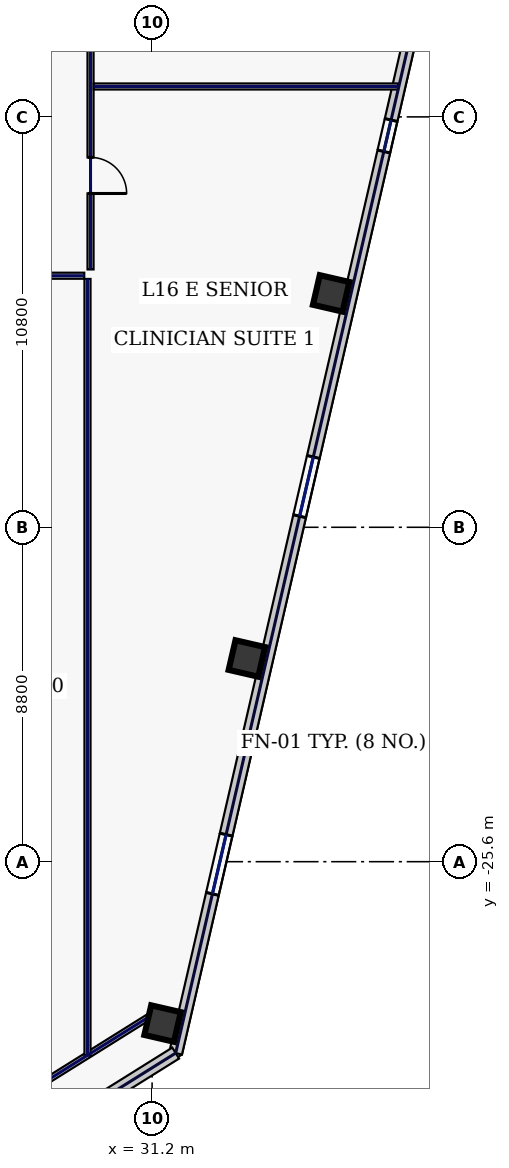
"""IFC4 building model, lengths in metres.
Left out: names, types, materials, properties, quantities, classifications, styles, units other than length and angle.
Written with IfcOpenShell. Run it as: python <this file> out.ifc"""

import sys

from ifc_helpers import new_model, si_unit, direction, frame, frame_2d, origin, origin_2d, place, context, subcontext, project, spatial, rectangle, hollow_rectangle, extrude, element, fill, save


model = new_model("IFC4")
c1 = context("Model", 3, precision=1e-05, world=origin(), true_north=direction((0.0, 1.0)))
c2 = subcontext(c1, "Body", "Model", "MODEL_VIEW")
j1 = project(units=[si_unit("LENGTHUNIT", "METRE"), si_unit("PLANEANGLEUNIT", "RADIAN")], contexts=[c1])
p1 = place(None, origin())
s1 = spatial("IfcSite", under=j1, at=p1, CompositionType="ELEMENT")
p2 = place(p1, origin())
s2 = spatial("IfcBuilding", under=s1, at=p2, CompositionType="ELEMENT")
p3 = place(p2, frame((0.0, 0.0, 75.4)))
s3 = spatial("IfcBuildingStorey", under=s2, at=p3, CompositionType="ELEMENT", Elevation=75.4)
for number, where, z_axis, x_axis in (
    (1, (31.476, -29.86, 0.0), (0.0, 0.0, 1.0), (0.974, -0.225, 0.0)),
    (2, (33.694, -20.252, 0.0), (0.0, 0.0, 1.0), (0.974, -0.225, 0.0)),
    (3, (35.912, -10.645, 0.0), (0.0, 0.0, 1.0), (0.974, -0.225, 0.0)),
):
    element("IfcColumn", number, at=place(p3, frame(where, z_axis=z_axis, x_axis=x_axis)), inside=s3, PredefinedType="COLUMN", context=c2, shape_type="SweptSolid", body=[
        extrude(hollow_rectangle(XDim=0.8, YDim=0.8, WallThickness=0.036, at=origin_2d()), origin(), (0.0, 0.0, 1.0), 3.74),
    ])
p4 = place(p3, frame((31.82, -30.637, 0.0), z_axis=(0.0, 0.0, 1.0), x_axis=(0.224949969076, 0.974370315338, 0.0)))
e4 = element("IfcWall", 4, at=p4, inside=s3, PredefinedType="STANDARD", context=c2, shape_type="SweptSolid", body=[
    extrude(rectangle(XDim=40.8, YDim=0.34, at=frame_2d((20.4, 0.0))), origin(), (0.0, 0.0, 1.0), 3.74),
])
p5 = place(p4, frame((4.3, 0.0, 0.58)))
e5 = element("IfcOpeningElement", 5, at=p5, cuts=e4, PredefinedType="OPENING", context=c2, shape_type="SweptSolid", body=[
    extrude(rectangle(XDim=1.6, YDim=2.3, at=frame_2d((0.8, 1.15))), frame((0.0, 0.18, 0.0), z_axis=(0.0, -1.0, 0.0), x_axis=(1.0, 0.0, 0.0)), (0.0, 0.0, 1.0), 0.36),
])
p6 = place(p4, frame((14.5, 0.0, 0.58)))
e6 = element("IfcOpeningElement", 6, at=p6, cuts=e4, PredefinedType="OPENING", context=c2, shape_type="SweptSolid", body=[
    extrude(rectangle(XDim=1.6, YDim=2.3, at=frame_2d((0.8, 1.15))), frame((0.0, 0.18, 0.0), z_axis=(0.0, -1.0, 0.0), x_axis=(1.0, 0.0, 0.0)), (0.0, 0.0, 1.0), 0.36),
])
p7 = place(p4, frame((24.35, 0.0, 0.75)))
e7 = element("IfcOpeningElement", 7, at=p7, cuts=e4, PredefinedType="OPENING", context=c2, shape_type="SweptSolid", body=[
    extrude(rectangle(XDim=0.85, YDim=1.85, at=frame_2d((0.425, 0.925))), frame((0.0, 0.18, 0.0), z_axis=(0.0, -1.0, 0.0), x_axis=(1.0, 0.0, 0.0)), (0.0, 0.0, 1.0), 0.36),
])
p8 = place(p4, frame((34.55, 0.0, 0.75)))
e8 = element("IfcOpeningElement", 8, at=p8, cuts=e4, PredefinedType="OPENING", context=c2, shape_type="SweptSolid", body=[
    extrude(rectangle(XDim=0.85, YDim=1.85, at=frame_2d((0.425, 0.925))), frame((0.0, 0.18, 0.0), z_axis=(0.0, -1.0, 0.0), x_axis=(1.0, 0.0, 0.0)), (0.0, 0.0, 1.0), 0.36),
])
p9 = place(p3, frame((25.788, -34.406, 0.0), z_axis=(0.0, 0.0, 1.0), x_axis=(0.848046504656, 0.529921811158, 0.0)))
e9 = element("IfcWall", 9, at=p9, inside=s3, PredefinedType="STANDARD", context=c2, shape_type="SweptSolid", body=[
    extrude(rectangle(XDim=7.113, YDim=0.34, at=frame_2d((3.557, 0.0))), origin(), (0.0, 0.0, 1.0), 3.74),
])
p10 = place(p3, frame((25.06, -33.468, 0.0), z_axis=(0.0, 0.0, 1.0), x_axis=(0.848043064089, 0.529927317139, 0.0)))
e10 = element("IfcWall", 10, at=p10, inside=s3, PredefinedType="PARTITIONING", context=c2, shape_type="SweptSolid", body=[
    extrude(rectangle(XDim=7.354, YDim=0.16, at=frame_2d((3.677, 0.0))), origin(), (0.0, 0.0, 1.0), 3.74),
])
p11 = place(p3, frame((29.58, 10.115, 0.0), z_axis=(0.0, 0.0, 1.0), x_axis=(0.0, -1.0, 0.0)))
e11 = element("IfcWall", 11, at=p11, inside=s3, PredefinedType="PARTITIONING", context=c2, shape_type="SweptSolid", body=[
    extrude(rectangle(XDim=20.13, YDim=0.16, at=frame_2d((10.065, 0.0))), origin(), (0.0, 0.0, 1.0), 3.74),
])
p12 = place(p11, frame((17.181, 0.0, 0.0)))
e12 = element("IfcOpeningElement", 12, at=p12, cuts=e11, PredefinedType="OPENING", context=c2, shape_type="SweptSolid", body=[
    extrude(rectangle(XDim=0.95, YDim=2.2, at=frame_2d((0.475, 1.1))), frame((0.0, 0.09, 0.0), z_axis=(0.0, -1.0, 0.0), x_axis=(1.0, 0.0, 0.0)), (0.0, 0.0, 1.0), 0.18),
])
p13 = place(p11, frame((12.95, 0.0, 0.0)))
e13 = element("IfcOpeningElement", 13, at=p13, cuts=e11, PredefinedType="OPENING", context=c2, shape_type="SweptSolid", body=[
    extrude(rectangle(XDim=0.95, YDim=2.2, at=frame_2d((0.475, 1.1))), frame((0.0, 0.09, 0.0), z_axis=(0.0, -1.0, 0.0), x_axis=(1.0, 0.0, 0.0)), (0.0, 0.0, 1.0), 0.18),
])
p14 = place(p11, frame((7.75, 0.0, 0.0)))
e14 = element("IfcOpeningElement", 14, at=p14, cuts=e11, PredefinedType="OPENING", context=c2, shape_type="SweptSolid", body=[
    extrude(rectangle(XDim=0.95, YDim=2.2, at=frame_2d((0.475, 1.1))), frame((0.0, 0.09, 0.0), z_axis=(0.0, -1.0, 0.0), x_axis=(1.0, 0.0, 0.0)), (0.0, 0.0, 1.0), 0.18),
])
p15 = place(p11, frame((2.219, 0.0, 0.0)))
e15 = element("IfcOpeningElement", 15, at=p15, cuts=e11, PredefinedType="OPENING", context=c2, shape_type="SweptSolid", body=[
    extrude(rectangle(XDim=0.95, YDim=2.2, at=frame_2d((0.475, 1.1))), frame((0.0, 0.09, 0.0), z_axis=(0.0, -1.0, 0.0), x_axis=(1.0, 0.0, 0.0)), (0.0, 0.0, 1.0), 0.18),
])
p16 = place(p3, frame((29.415, -10.18, 0.0), z_axis=(0.0, 0.0, 1.0), x_axis=(-1.0, 0.0, 0.0)))
e16 = element("IfcWall", 16, at=p16, inside=s3, PredefinedType="PARTITIONING", context=c2, shape_type="SweptSolid", body=[
    extrude(rectangle(XDim=58.83, YDim=0.16, at=frame_2d((29.415, 0.0))), origin(), (0.0, 0.0, 1.0), 3.74),
])
p17 = place(p16, frame((55.831, 0.0, 0.0)))
e17 = element("IfcOpeningElement", 17, at=p17, cuts=e16, PredefinedType="OPENING", context=c2, shape_type="SweptSolid", body=[
    extrude(rectangle(XDim=1.3, YDim=2.2, at=frame_2d((0.65, 1.1))), frame((0.0, 0.09, 0.0), z_axis=(0.0, -1.0, 0.0), x_axis=(1.0, 0.0, 0.0)), (0.0, 0.0, 1.0), 0.18),
])
p18 = place(p16, frame((49.775, 0.0, 0.0)))
e18 = element("IfcOpeningElement", 18, at=p18, cuts=e16, PredefinedType="OPENING", context=c2, shape_type="SweptSolid", body=[
    extrude(rectangle(XDim=1.3, YDim=2.2, at=frame_2d((0.65, 1.1))), frame((0.0, 0.09, 0.0), z_axis=(0.0, -1.0, 0.0), x_axis=(1.0, 0.0, 0.0)), (0.0, 0.0, 1.0), 0.18),
])
p19 = place(p16, frame((43.2, 0.0, 0.0)))
e19 = element("IfcOpeningElement", 19, at=p19, cuts=e16, PredefinedType="OPENING", context=c2, shape_type="SweptSolid", body=[
    extrude(rectangle(XDim=0.95, YDim=2.2, at=frame_2d((0.475, 1.1))), frame((0.0, 0.09, 0.0), z_axis=(0.0, -1.0, 0.0), x_axis=(1.0, 0.0, 0.0)), (0.0, 0.0, 1.0), 0.18),
])
p20 = place(p16, frame((38.0, 0.0, 0.0)))
e20 = element("IfcOpeningElement", 20, at=p20, cuts=e16, PredefinedType="OPENING", context=c2, shape_type="SweptSolid", body=[
    extrude(rectangle(XDim=0.95, YDim=2.2, at=frame_2d((0.475, 1.1))), frame((0.0, 0.09, 0.0), z_axis=(0.0, -1.0, 0.0), x_axis=(1.0, 0.0, 0.0)), (0.0, 0.0, 1.0), 0.18),
])
p21 = place(p16, frame((32.7, 0.0, 0.0)))
e21 = element("IfcOpeningElement", 21, at=p21, cuts=e16, PredefinedType="OPENING", context=c2, shape_type="SweptSolid", body=[
    extrude(rectangle(XDim=0.95, YDim=2.2, at=frame_2d((0.475, 1.1))), frame((0.0, 0.09, 0.0), z_axis=(0.0, -1.0, 0.0), x_axis=(1.0, 0.0, 0.0)), (0.0, 0.0, 1.0), 0.18),
])
p22 = place(p16, frame((27.3, 0.0, 0.0)))
e22 = element("IfcOpeningElement", 22, at=p22, cuts=e16, PredefinedType="OPENING", context=c2, shape_type="SweptSolid", body=[
    extrude(rectangle(XDim=0.95, YDim=2.2, at=frame_2d((0.475, 1.1))), frame((0.0, 0.09, 0.0), z_axis=(0.0, -1.0, 0.0), x_axis=(1.0, 0.0, 0.0)), (0.0, 0.0, 1.0), 0.18),
])
p23 = place(p16, frame((21.87, 0.0, 0.0)))
e23 = element("IfcOpeningElement", 23, at=p23, cuts=e16, PredefinedType="OPENING", context=c2, shape_type="SweptSolid", body=[
    extrude(rectangle(XDim=1.05, YDim=2.2, at=frame_2d((0.525, 1.1))), frame((0.0, 0.09, 0.0), z_axis=(0.0, -1.0, 0.0), x_axis=(1.0, 0.0, 0.0)), (0.0, 0.0, 1.0), 0.18),
])
p24 = place(p16, frame((16.41, 0.0, 0.0)))
e24 = element("IfcOpeningElement", 24, at=p24, cuts=e16, PredefinedType="OPENING", context=c2, shape_type="SweptSolid", body=[
    extrude(rectangle(XDim=0.95, YDim=2.2, at=frame_2d((0.475, 1.1))), frame((0.0, 0.09, 0.0), z_axis=(0.0, -1.0, 0.0), x_axis=(1.0, 0.0, 0.0)), (0.0, 0.0, 1.0), 0.18),
])
p25 = place(p16, frame((11.66, 0.0, 0.0)))
e25 = element("IfcOpeningElement", 25, at=p25, cuts=e16, PredefinedType="OPENING", context=c2, shape_type="SweptSolid", body=[
    extrude(rectangle(XDim=1.45, YDim=2.2, at=frame_2d((0.725, 1.1))), frame((0.0, 0.09, 0.0), z_axis=(0.0, -1.0, 0.0), x_axis=(1.0, 0.0, 0.0)), (0.0, 0.0, 1.0), 0.18),
])
p26 = place(p16, frame((7.97, 0.0, 0.0)))
e26 = element("IfcOpeningElement", 26, at=p26, cuts=e16, PredefinedType="OPENING", context=c2, shape_type="SweptSolid", body=[
    extrude(rectangle(XDim=1.3, YDim=2.2, at=frame_2d((0.65, 1.1))), frame((0.0, 0.09, 0.0), z_axis=(0.0, -1.0, 0.0), x_axis=(1.0, 0.0, 0.0)), (0.0, 0.0, 1.0), 0.18),
])
p27 = place(p16, frame((4.375, 0.0, 0.0)))
e27 = element("IfcOpeningElement", 27, at=p27, cuts=e16, PredefinedType="OPENING", context=c2, shape_type="SweptSolid", body=[
    extrude(rectangle(XDim=1.3, YDim=2.2, at=frame_2d((0.65, 1.1))), frame((0.0, 0.09, 0.0), z_axis=(0.0, -1.0, 0.0), x_axis=(1.0, 0.0, 0.0)), (0.0, 0.0, 1.0), 0.18),
])
p28 = place(p16, frame((1.244, 0.0, 0.0)))
e28 = element("IfcOpeningElement", 28, at=p28, cuts=e16, PredefinedType="OPENING", context=c2, shape_type="SweptSolid", body=[
    extrude(rectangle(XDim=1.05, YDim=2.2, at=frame_2d((0.525, 1.1))), frame((0.0, 0.09, 0.0), z_axis=(0.0, -1.0, 0.0), x_axis=(1.0, 0.0, 0.0)), (0.0, 0.0, 1.0), 0.18),
])
p29 = place(p3, frame((29.5, -30.703, 0.0), z_axis=(0.0, 0.0, 1.0), x_axis=(0.0, 1.0, 0.0)))
e29 = element("IfcWall", 29, at=p29, inside=s3, PredefinedType="PARTITIONING", context=c2, shape_type="SweptSolid", body=[
    extrude(rectangle(XDim=20.438, YDim=0.16, at=frame_2d((10.219, 0.0))), origin(), (0.0, 0.0, 1.0), 3.74),
])
p30 = place(p3, frame((29.665, -5.2, 0.0), z_axis=(0.0, 0.0, 1.0), x_axis=(1.0, 0.0, 0.0)))
e30 = element("IfcWall", 30, at=p30, inside=s3, PredefinedType="PARTITIONING", context=c2, shape_type="SweptSolid", body=[
    extrude(rectangle(XDim=8.007, YDim=0.16, at=frame_2d((4.003, 0.0))), origin(), (0.0, 0.0, 1.0), 3.74),
])
p31 = place(p5, origin())
e31 = element("IfcWindow", 31, at=p31, inside=s3, PartitioningType="SINGLE_PANEL", PredefinedType="WINDOW", context=c2, shape_type="SweptSolid", body=[
    extrude(rectangle(XDim=1.6, YDim=2.3, at=frame_2d((0.8, 1.15))), frame((0.0, 0.03, 0.0), z_axis=(0.0, -1.0, 0.0), x_axis=(1.0, 0.0, 0.0)), (0.0, 0.0, 1.0), 0.06),
])
fill(e5, e31)
p32 = place(p6, origin())
e32 = element("IfcWindow", 32, at=p32, inside=s3, PartitioningType="SINGLE_PANEL", PredefinedType="WINDOW", context=c2, shape_type="SweptSolid", body=[
    extrude(rectangle(XDim=1.6, YDim=2.3, at=frame_2d((0.8, 1.15))), frame((0.0, 0.03, 0.0), z_axis=(0.0, -1.0, 0.0), x_axis=(1.0, 0.0, 0.0)), (0.0, 0.0, 1.0), 0.06),
])
fill(e6, e32)
p33 = place(p7, origin())
e33 = element("IfcWindow", 33, at=p33, inside=s3, PartitioningType="SINGLE_PANEL", PredefinedType="WINDOW", context=c2, shape_type="SweptSolid", body=[
    extrude(rectangle(XDim=0.85, YDim=1.85, at=frame_2d((0.425, 0.925))), frame((0.0, 0.03, 0.0), z_axis=(0.0, -1.0, 0.0), x_axis=(1.0, 0.0, 0.0)), (0.0, 0.0, 1.0), 0.06),
])
fill(e7, e33)
p34 = place(p12, origin())
e34 = element("IfcDoor", 34, at=p34, inside=s3, OperationType="SINGLE_SWING_RIGHT", PredefinedType="DOOR", context=c2, shape_type="SweptSolid", body=[
    extrude(rectangle(XDim=0.95, YDim=2.2, at=frame_2d((0.475, 1.1))), frame((0.0, 0.025, 0.0), z_axis=(0.0, -1.0, 0.0), x_axis=(1.0, 0.0, 0.0)), (0.0, 0.0, 1.0), 0.05),
])
fill(e12, e34)
save(model, sys.argv[1])
